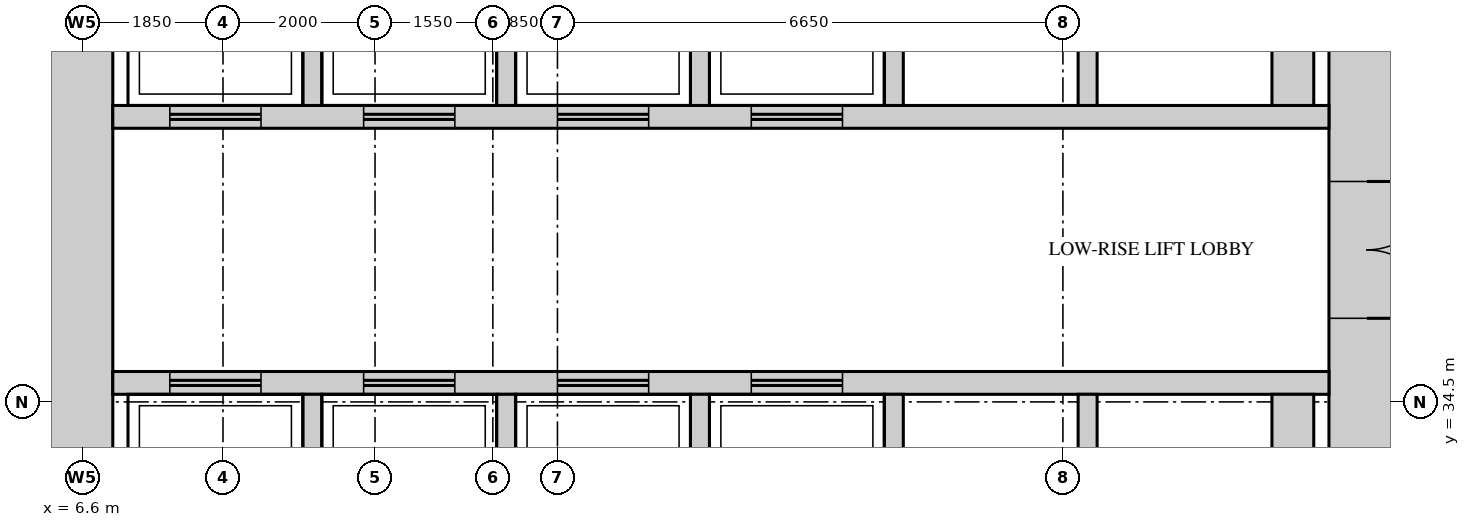
"""IFC4 building model, lengths in metres.
Left out: names, types, materials, properties, quantities, classifications, styles, units other than length and angle.
Written with IfcOpenShell. Run it as: python <this file> out.ifc"""

import sys

from ifc_helpers import new_model, si_unit, direction, frame, frame_2d, origin, place, context, subcontext, project, spatial, rectangle, extrude, source, transform, mapped, element, fill, save


model = new_model("IFC4")
c1 = context("Model", 3, precision=1e-05, world=origin(), true_north=direction((0.0, 1.0)))
c2 = subcontext(c1, "Body", "Model", "MODEL_VIEW")
j1 = project(units=[si_unit("LENGTHUNIT", "METRE"), si_unit("PLANEANGLEUNIT", "RADIAN")], contexts=[c1])
p1 = place(None, origin())
s1 = spatial("IfcSite", under=j1, at=p1, CompositionType="ELEMENT")
p2 = place(p1, origin())
s2 = spatial("IfcBuilding", under=s1, at=p2, CompositionType="ELEMENT")
p3 = place(p2, frame((0.0, 0.0, 145.5)))
s3 = spatial("IfcBuildingStorey", under=s2, at=p3, CompositionType="ELEMENT", Elevation=145.5)
m1 = source(origin(), c2, "Body", "SweptSolid", [
    extrude(rectangle(XDim=28.0, YDim=1.0, at=frame_2d((14.0, 0.0))), origin(), (0.0, 0.0, 1.0), 4.1),
])
p4 = place(p3, frame((23.5, 13.0, 0.0), z_axis=(0.0, 0.0, 1.0), x_axis=(0.0, 1.0, 0.0)))
e1 = element("IfcWall", 1, at=p4, inside=s3, PredefinedType="SHEAR", context=c2, shape_type="MappedRepresentation", body=[
    mapped(m1, transform((0.0, 0.0, 0.0))),
])
m2 = source(origin(), c2, "Body", "SweptSolid", [
    extrude(rectangle(XDim=1.8, YDim=2.1, at=frame_2d((0.9, 1.05))), frame((0.0, 0.51, 0.0), z_axis=(0.0, -1.0, 0.0), x_axis=(1.0, 0.0, 0.0)), (0.0, 0.0, 1.0), 1.02),
])
p5 = place(p4, frame((22.6, 0.0, 0.0)))
e2 = element("IfcOpeningElement", 2, at=p5, cuts=e1, PredefinedType="OPENING", context=c2, shape_type="MappedRepresentation", body=[
    mapped(m2, transform((0.0, 0.0, 0.0))),
])
m3 = source(origin(), c2, "Body", "SweptSolid", [
    extrude(rectangle(XDim=1.2, YDim=2.1, at=frame_2d((0.6, 1.05))), frame((0.0, 0.51, 0.0), z_axis=(0.0, -1.0, 0.0), x_axis=(1.0, 0.0, 0.0)), (0.0, 0.0, 1.0), 1.02),
])
p6 = place(p4, frame((12.35, 0.0, 0.0)))
e3 = element("IfcOpeningElement", 3, at=p6, cuts=e1, PredefinedType="OPENING", context=c2, shape_type="MappedRepresentation", body=[
    mapped(m3, transform((0.0, 0.0, 0.0))),
])
m4 = source(origin(), c2, "Body", "SweptSolid", [
    extrude(rectangle(XDim=0.9, YDim=2.1, at=frame_2d((0.45, 1.05))), frame((0.0, 0.51, 0.0), z_axis=(0.0, -1.0, 0.0), x_axis=(1.0, 0.0, 0.0)), (0.0, 0.0, 1.0), 1.02),
])
p7 = place(p4, frame((4.6, 0.0, 0.0)))
e4 = element("IfcOpeningElement", 4, at=p7, cuts=e1, PredefinedType="OPENING", context=c2, shape_type="MappedRepresentation", body=[
    mapped(m4, transform((0.0, 0.0, 0.0))),
])
p8 = place(p3, frame((6.5, 13.0, 0.0), z_axis=(0.0, 0.0, 1.0), x_axis=(0.0, 1.0, 0.0)))
e5 = element("IfcWall", 5, at=p8, inside=s3, PredefinedType="SHEAR", context=c2, shape_type="MappedRepresentation", body=[
    mapped(m1, transform((0.0, 0.0, 0.0))),
])
m5 = source(origin(), c2, "Body", "SweptSolid", [
    extrude(rectangle(XDim=16.0, YDim=0.3, at=frame_2d((8.0, 0.0))), origin(), (0.0, 0.0, 1.0), 4.1),
])
p9 = place(p3, frame((7.0, 38.25, 0.0), z_axis=(0.0, 0.0, 1.0), x_axis=(1.0, 0.0, 0.0)))
e6 = element("IfcWall", 6, at=p9, inside=s3, PredefinedType="STANDARD", context=c2, shape_type="MappedRepresentation", body=[
    mapped(m5, transform((0.0, 0.0, 0.0))),
])
m6 = source(origin(), c2, "Body", "SweptSolid", [
    extrude(rectangle(XDim=1.2, YDim=2.1, at=frame_2d((0.6, 1.05))), frame((0.0, 0.16, 0.0), z_axis=(0.0, -1.0, 0.0), x_axis=(1.0, 0.0, 0.0)), (0.0, 0.0, 1.0), 0.32),
])
p10 = place(p9, frame((0.75, 0.0, 0.0)))
e7 = element("IfcOpeningElement", 7, at=p10, cuts=e6, PredefinedType="OPENING", context=c2, shape_type="MappedRepresentation", body=[
    mapped(m6, transform((0.0, 0.0, 0.0))),
])
p11 = place(p9, frame((3.3, 0.0, 0.0)))
e8 = element("IfcOpeningElement", 8, at=p11, cuts=e6, PredefinedType="OPENING", context=c2, shape_type="MappedRepresentation", body=[
    mapped(m6, transform((0.0, 0.0, 0.0))),
])
p12 = place(p9, frame((5.85, 0.0, 0.0)))
e9 = element("IfcOpeningElement", 9, at=p12, cuts=e6, PredefinedType="OPENING", context=c2, shape_type="MappedRepresentation", body=[
    mapped(m6, transform((0.0, 0.0, 0.0))),
])
p13 = place(p9, frame((8.4, 0.0, 0.0)))
e10 = element("IfcOpeningElement", 10, at=p13, cuts=e6, PredefinedType="OPENING", context=c2, shape_type="MappedRepresentation", body=[
    mapped(m6, transform((0.0, 0.0, 0.0))),
])
p14 = place(p3, frame((7.0, 34.75, 0.0), z_axis=(0.0, 0.0, 1.0), x_axis=(1.0, 0.0, 0.0)))
e11 = element("IfcWall", 11, at=p14, inside=s3, PredefinedType="STANDARD", context=c2, shape_type="MappedRepresentation", body=[
    mapped(m5, transform((0.0, 0.0, 0.0))),
])
p15 = place(p14, frame((0.75, 0.0, 0.0)))
e12 = element("IfcOpeningElement", 12, at=p15, cuts=e11, PredefinedType="OPENING", context=c2, shape_type="MappedRepresentation", body=[
    mapped(m6, transform((0.0, 0.0, 0.0))),
])
p16 = place(p14, frame((3.3, 0.0, 0.0)))
e13 = element("IfcOpeningElement", 13, at=p16, cuts=e11, PredefinedType="OPENING", context=c2, shape_type="MappedRepresentation", body=[
    mapped(m6, transform((0.0, 0.0, 0.0))),
])
p17 = place(p14, frame((5.85, 0.0, 0.0)))
e14 = element("IfcOpeningElement", 14, at=p17, cuts=e11, PredefinedType="OPENING", context=c2, shape_type="MappedRepresentation", body=[
    mapped(m6, transform((0.0, 0.0, 0.0))),
])
p18 = place(p14, frame((8.4, 0.0, 0.0)))
e15 = element("IfcOpeningElement", 15, at=p18, cuts=e11, PredefinedType="OPENING", context=c2, shape_type="MappedRepresentation", body=[
    mapped(m6, transform((0.0, 0.0, 0.0))),
])
m7 = source(origin(), c2, "Body", "SweptSolid", [
    extrude(rectangle(XDim=2.6, YDim=0.25, at=frame_2d((1.3, 0.0))), origin(), (0.0, 0.0, 1.0), 4.1),
])
for number, where, z_axis, x_axis in (
    (16, (9.625, 38.4, 0.0), (0.0, 0.0, 1.0), (0.0, 1.0, 0.0)),
    (17, (12.175, 38.4, 0.0), (0.0, 0.0, 1.0), (0.0, 1.0, 0.0)),
    (18, (14.725, 38.4, 0.0), (0.0, 0.0, 1.0), (0.0, 1.0, 0.0)),
    (19, (17.275, 38.4, 0.0), (0.0, 0.0, 1.0), (0.0, 1.0, 0.0)),
    (20, (19.825, 38.4, 0.0), (0.0, 0.0, 1.0), (0.0, 1.0, 0.0)),
):
    element("IfcWall", number, at=place(p3, frame(where, z_axis=z_axis, x_axis=x_axis)), inside=s3, PredefinedType="STANDARD", context=c2, shape_type="MappedRepresentation", body=[
        mapped(m7, transform((0.0, 0.0, 0.0))),
    ])
m8 = source(origin(), c2, "Body", "SweptSolid", [
    extrude(rectangle(XDim=2.6, YDim=0.55, at=frame_2d((1.3, 0.0))), origin(), (0.0, 0.0, 1.0), 4.1),
])
p19 = place(p3, frame((22.525, 38.4, 0.0), z_axis=(0.0, 0.0, 1.0), x_axis=(0.0, 1.0, 0.0)))
e21 = element("IfcWall", 21, at=p19, inside=s3, PredefinedType="STANDARD", context=c2, shape_type="MappedRepresentation", body=[
    mapped(m8, transform((0.0, 0.0, 0.0))),
])
m9 = source(origin(), c2, "Body", "SweptSolid", [
    extrude(rectangle(XDim=2.4, YDim=0.25, at=frame_2d((1.2, 0.0))), origin(), (0.0, 0.0, 1.0), 4.1),
])
for number, where, z_axis, x_axis in (
    (22, (9.625, 32.2, 0.0), (0.0, 0.0, 1.0), (0.0, 1.0, 0.0)),
    (23, (12.175, 32.2, 0.0), (0.0, 0.0, 1.0), (0.0, 1.0, 0.0)),
    (24, (14.725, 32.2, 0.0), (0.0, 0.0, 1.0), (0.0, 1.0, 0.0)),
    (25, (17.275, 32.2, 0.0), (0.0, 0.0, 1.0), (0.0, 1.0, 0.0)),
    (26, (19.825, 32.2, 0.0), (0.0, 0.0, 1.0), (0.0, 1.0, 0.0)),
):
    element("IfcWall", number, at=place(p3, frame(where, z_axis=z_axis, x_axis=x_axis)), inside=s3, PredefinedType="STANDARD", context=c2, shape_type="MappedRepresentation", body=[
        mapped(m9, transform((0.0, 0.0, 0.0))),
    ])
m10 = source(origin(), c2, "Body", "SweptSolid", [
    extrude(rectangle(XDim=2.4, YDim=0.55, at=frame_2d((1.2, 0.0))), origin(), (0.0, 0.0, 1.0), 4.1),
])
p20 = place(p3, frame((22.525, 32.2, 0.0), z_axis=(0.0, 0.0, 1.0), x_axis=(0.0, 1.0, 0.0)))
e27 = element("IfcWall", 27, at=p20, inside=s3, PredefinedType="STANDARD", context=c2, shape_type="MappedRepresentation", body=[
    mapped(m10, transform((0.0, 0.0, 0.0))),
])
m11 = source(origin(), c2, "Body", "SweptSolid", [
    extrude(rectangle(XDim=1.8, YDim=2.1, at=frame_2d((0.9, 1.05))), frame((0.0, 0.45, 0.0), z_axis=(0.0, -1.0, 0.0), x_axis=(1.0, 0.0, 0.0)), (0.0, 0.0, 1.0), 0.9),
])
p21 = place(p5, origin())
e28 = element("IfcDoor", 28, at=p21, inside=s3, OperationType="DOUBLE_DOOR_SINGLE_SWING", PredefinedType="DOOR", context=c2, shape_type="MappedRepresentation", body=[
    mapped(m11, transform((0.0, 0.0, 0.0))),
])
fill(e2, e28)
m12 = source(origin(), c2, "Body", "SweptSolid", [
    extrude(rectangle(XDim=1.2, YDim=2.1, at=frame_2d((0.6, 1.05))), frame((0.0, 0.025, 0.0), z_axis=(0.0, -1.0, 0.0), x_axis=(1.0, 0.0, 0.0)), (0.0, 0.0, 1.0), 0.05),
])
p22 = place(p15, origin())
e29 = element("IfcDoor", 29, at=p22, inside=s3, OperationType="DOUBLE_DOOR_SLIDING", PredefinedType="DOOR", context=c2, shape_type="MappedRepresentation", body=[
    mapped(m12, transform((0.0, 0.0, 0.0))),
])
fill(e12, e29)
p23 = place(p16, origin())
e30 = element("IfcDoor", 30, at=p23, inside=s3, OperationType="DOUBLE_DOOR_SLIDING", PredefinedType="DOOR", context=c2, shape_type="MappedRepresentation", body=[
    mapped(m12, transform((0.0, 0.0, 0.0))),
])
fill(e13, e30)
p24 = place(p17, origin())
e31 = element("IfcDoor", 31, at=p24, inside=s3, OperationType="DOUBLE_DOOR_SLIDING", PredefinedType="DOOR", context=c2, shape_type="MappedRepresentation", body=[
    mapped(m12, transform((0.0, 0.0, 0.0))),
])
fill(e14, e31)
p25 = place(p18, origin())
e32 = element("IfcDoor", 32, at=p25, inside=s3, OperationType="DOUBLE_DOOR_SLIDING", PredefinedType="DOOR", context=c2, shape_type="MappedRepresentation", body=[
    mapped(m12, transform((0.0, 0.0, 0.0))),
])
fill(e15, e32)
p26 = place(p10, origin())
e33 = element("IfcDoor", 33, at=p26, inside=s3, OperationType="DOUBLE_DOOR_SLIDING", PredefinedType="DOOR", context=c2, shape_type="MappedRepresentation", body=[
    mapped(m12, transform((0.0, 0.0, 0.0))),
])
fill(e7, e33)
p27 = place(p11, origin())
e34 = element("IfcDoor", 34, at=p27, inside=s3, OperationType="DOUBLE_DOOR_SLIDING", PredefinedType="DOOR", context=c2, shape_type="MappedRepresentation", body=[
    mapped(m12, transform((0.0, 0.0, 0.0))),
])
fill(e8, e34)
p28 = place(p12, origin())
e35 = element("IfcDoor", 35, at=p28, inside=s3, OperationType="DOUBLE_DOOR_SLIDING", PredefinedType="DOOR", context=c2, shape_type="MappedRepresentation", body=[
    mapped(m12, transform((0.0, 0.0, 0.0))),
])
fill(e9, e35)
p29 = place(p13, origin())
e36 = element("IfcDoor", 36, at=p29, inside=s3, OperationType="DOUBLE_DOOR_SLIDING", PredefinedType="DOOR", context=c2, shape_type="MappedRepresentation", body=[
    mapped(m12, transform((0.0, 0.0, 0.0))),
])
fill(e10, e36)
save(model, sys.argv[1])
